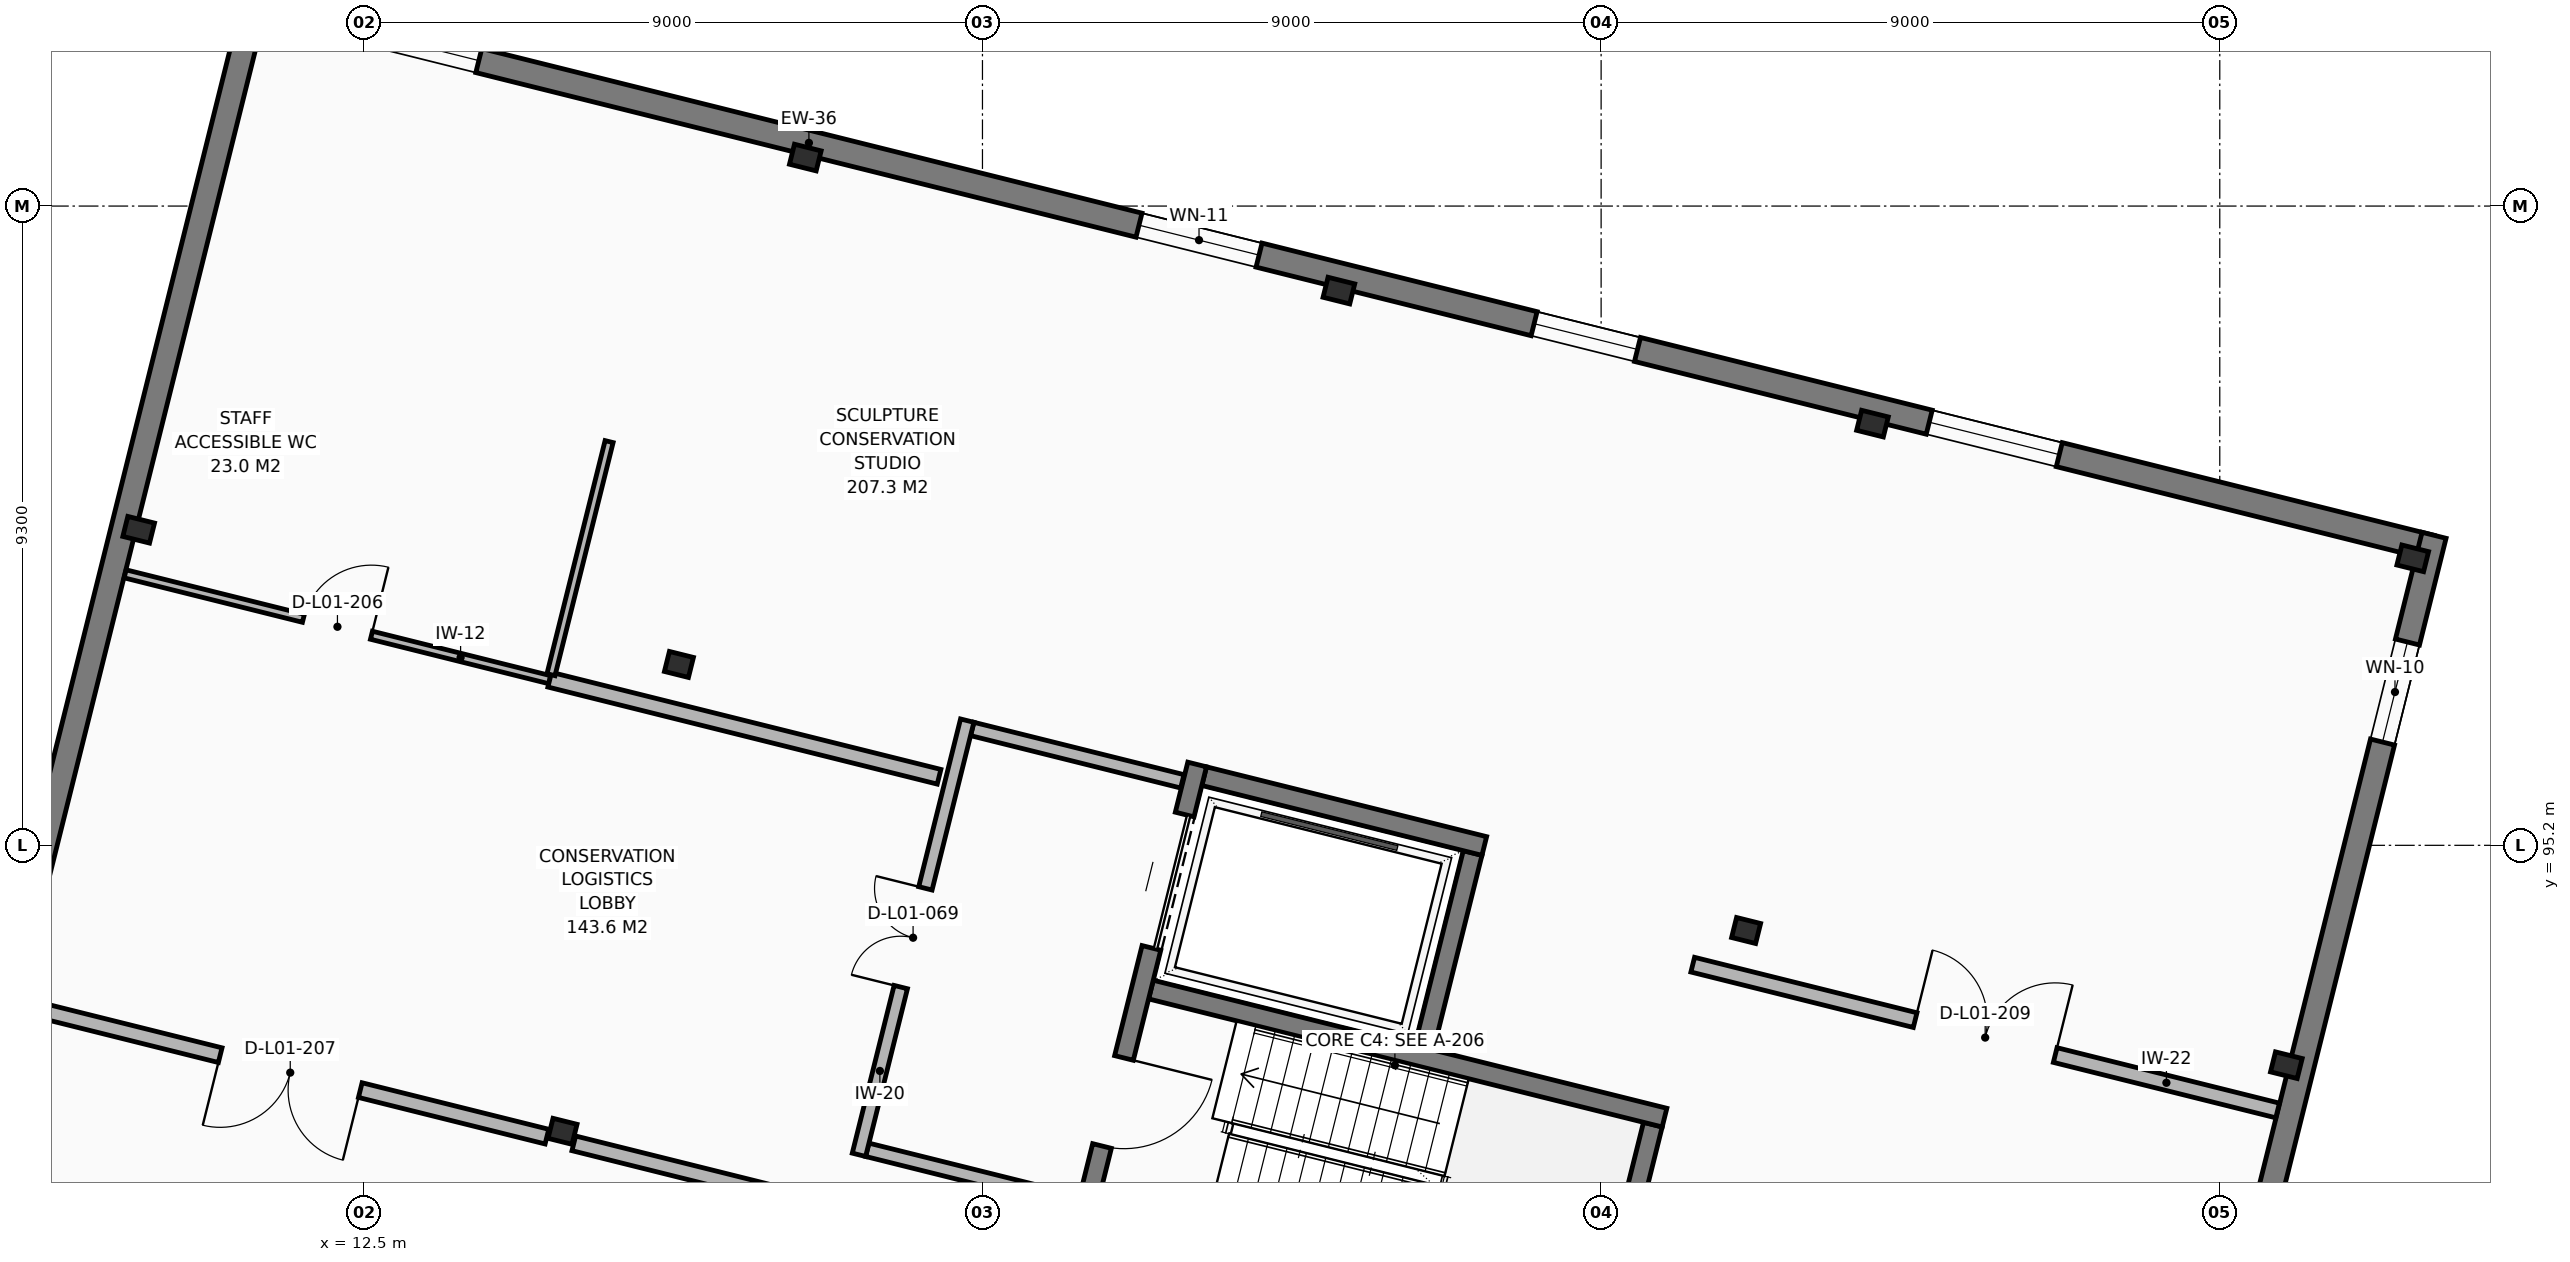
"""IFC4 building model, lengths in metres.
Left out: names, types, materials, properties, quantities, classifications, styles, units other than length and angle.
Written with IfcOpenShell. Run it as: python <this file> out.ifc"""

import sys

from ifc_helpers import new_model, si_unit, direction, frame, frame_2d, origin, origin_2d, place, context, subcontext, project, spatial, rectangle, i_section, extrude, element, fill, save


model = new_model("IFC4")
c1 = context("Model", 3, precision=1e-05, world=origin(), true_north=direction((0.0, 1.0)))
c2 = subcontext(c1, "Body", "Model", "MODEL_VIEW")
j1 = project(units=[si_unit("LENGTHUNIT", "METRE"), si_unit("PLANEANGLEUNIT", "RADIAN")], contexts=[c1])
p1 = place(None, origin())
s1 = spatial("IfcSite", under=j1, at=p1, CompositionType="ELEMENT")
p2 = place(p1, origin())
s2 = spatial("IfcBuilding", under=s1, at=p2, CompositionType="ELEMENT")
p3 = place(p2, frame((0.0, 0.0, 5.1)))
s3 = spatial("IfcBuildingStorey", under=s2, at=p3, CompositionType="ELEMENT", Elevation=5.1)
p4 = place(p3, frame((9.225, 99.791, 0.0), z_axis=(0.0, 0.0, 1.0), x_axis=(0.970295726276, -0.2419218956, 0.0)))
e1 = element("IfcColumn", 1, at=p4, inside=s3, PredefinedType="COLUMN", context=c2, shape_type="SweptSolid", body=[
    extrude(i_section(OverallWidth=0.3, OverallDepth=0.4, WebThickness=0.013, FlangeThickness=0.024, FilletRadius=0.027, at=origin_2d()), origin(), (0.0, 0.0, 1.0), 4.42),
])
for number, where, z_axis, x_axis in (
    (2, (15.391, 91.039, 0.0), (0.0, 0.0, 1.0), (0.97, -0.242, 0.0)),
    (3, (17.084, 97.831, 0.0), (0.0, 0.0, 1.0), (0.97, -0.242, 0.0)),
):
    element("IfcColumn", number, at=place(p3, frame(where, z_axis=z_axis, x_axis=x_axis)), inside=s3, PredefinedType="COLUMN", context=c2, shape_type="SweptSolid", body=[
        extrude(i_section(OverallWidth=0.3, OverallDepth=0.36, WebThickness=0.012, FlangeThickness=0.022, FilletRadius=0.027, at=origin_2d()), origin(), (0.0, 0.0, 1.0), 4.42),
    ])
for number, where, z_axis, x_axis in (
    (4, (18.923, 105.206, 0.0), (0.0, 0.0, 1.0), (0.97, -0.242, 0.0)),
    (5, (26.685, 103.27, 0.0), (0.0, 0.0, 1.0), (0.97, -0.242, 0.0)),
):
    element("IfcColumn", number, at=place(p3, frame(where, z_axis=z_axis, x_axis=x_axis)), inside=s3, PredefinedType="COLUMN", context=c2, shape_type="SweptSolid", body=[
        extrude(i_section(OverallWidth=0.3, OverallDepth=0.4, WebThickness=0.013, FlangeThickness=0.024, FilletRadius=0.027, at=origin_2d()), origin(), (0.0, 0.0, 1.0), 4.42),
    ])
p5 = place(p3, frame((32.609, 93.961, 0.0), z_axis=(0.0, 0.0, 1.0), x_axis=(0.970295726276, -0.2419218956, 0.0)))
e6 = element("IfcColumn", 6, at=p5, inside=s3, PredefinedType="COLUMN", context=c2, shape_type="SweptSolid", body=[
    extrude(i_section(OverallWidth=0.3, OverallDepth=0.36, WebThickness=0.012, FlangeThickness=0.022, FilletRadius=0.027, at=origin_2d()), origin(), (0.0, 0.0, 1.0), 4.42),
])
for number, where, z_axis, x_axis in (
    (7, (34.448, 101.335, 0.0), (0.0, 0.0, 1.0), (0.97, -0.242, 0.0)),
    (8, (40.469, 92.001, 0.0), (0.0, 0.0, 1.0), (0.97, -0.242, 0.0)),
    (9, (42.307, 99.375, 0.0), (0.0, 0.0, 1.0), (0.97, -0.242, 0.0)),
):
    element("IfcColumn", number, at=place(p3, frame(where, z_axis=z_axis, x_axis=x_axis)), inside=s3, PredefinedType="COLUMN", context=c2, shape_type="SweptSolid", body=[
        extrude(i_section(OverallWidth=0.3, OverallDepth=0.4, WebThickness=0.013, FlangeThickness=0.024, FilletRadius=0.027, at=origin_2d()), origin(), (0.0, 0.0, 1.0), 4.42),
    ])
p6 = place(p3, frame((5.383, 85.29, 0.0), z_axis=(0.0, 0.0, 1.0), x_axis=(0.241916316577, 0.970297117266, 0.0)))
e10 = element("IfcWall", 10, at=p6, inside=s3, PredefinedType="SOLIDWALL", context=c2, shape_type="SweptSolid", body=[
    extrude(rectangle(XDim=22.82, YDim=0.36, at=frame_2d((11.41, 0.0))), origin(), (0.0, 0.0, 1.0), 4.18),
])
p7 = place(p6, frame((1.6, 0.0, 0.85)))
e11 = element("IfcOpeningElement", 11, at=p7, cuts=e10, PredefinedType="OPENING", context=c2, shape_type="SweptSolid", body=[
    extrude(rectangle(XDim=1.55, YDim=1.5, at=frame_2d((0.775, 0.75))), frame((0.0, 0.19, 0.0), z_axis=(0.0, -1.0, 0.0), x_axis=(1.0, 0.0, 0.0)), (0.0, 0.0, 1.0), 0.38),
])
p8 = place(p3, frame((10.729, 107.475, 0.0), z_axis=(0.0, 0.0, 1.0), x_axis=(0.970297203556, -0.241915970475, 0.0)))
e12 = element("IfcWall", 12, at=p8, inside=s3, PredefinedType="SOLIDWALL", context=c2, shape_type="SweptSolid", body=[
    extrude(rectangle(XDim=32.82, YDim=0.36, at=frame_2d((16.41, 0.0))), origin(), (0.0, 0.0, 1.0), 4.18),
])
p9 = place(p8, frame((1.6, 0.0, 0.85)))
e13 = element("IfcOpeningElement", 13, at=p9, cuts=e12, PredefinedType="OPENING", context=c2, shape_type="SweptSolid", body=[
    extrude(rectangle(XDim=1.95, YDim=1.5, at=frame_2d((0.975, 0.75))), frame((0.0, 0.19, 0.0), z_axis=(0.0, -1.0, 0.0), x_axis=(1.0, 0.0, 0.0)), (0.0, 0.0, 1.0), 0.38),
])
p10 = place(p8, frame((13.448, 0.0, 0.85)))
e14 = element("IfcOpeningElement", 14, at=p10, cuts=e12, PredefinedType="OPENING", context=c2, shape_type="SweptSolid", body=[
    extrude(rectangle(XDim=1.8, YDim=1.7, at=frame_2d((0.9, 0.85))), frame((0.0, 0.19, 0.0), z_axis=(0.0, -1.0, 0.0), x_axis=(1.0, 0.0, 0.0)), (0.0, 0.0, 1.0), 0.38),
])
p11 = place(p8, frame((19.372, 0.0, 0.85)))
e15 = element("IfcOpeningElement", 15, at=p11, cuts=e12, PredefinedType="OPENING", context=c2, shape_type="SweptSolid", body=[
    extrude(rectangle(XDim=1.55, YDim=1.5, at=frame_2d((0.775, 0.75))), frame((0.0, 0.19, 0.0), z_axis=(0.0, -1.0, 0.0), x_axis=(1.0, 0.0, 0.0)), (0.0, 0.0, 1.0), 0.38),
])
p12 = place(p8, frame((25.296, 0.0, 0.85)))
e16 = element("IfcOpeningElement", 16, at=p12, cuts=e12, PredefinedType="OPENING", context=c2, shape_type="SweptSolid", body=[
    extrude(rectangle(XDim=1.95, YDim=1.5, at=frame_2d((0.975, 0.75))), frame((0.0, 0.19, 0.0), z_axis=(0.0, -1.0, 0.0), x_axis=(1.0, 0.0, 0.0)), (0.0, 0.0, 1.0), 0.38),
])
p13 = place(p3, frame((42.617, 99.71, 0.0), z_axis=(0.0, 0.0, 1.0), x_axis=(-0.241906463411, -0.970299573822, 0.0)))
e17 = element("IfcWall", 17, at=p13, inside=s3, PredefinedType="SOLIDWALL", context=c2, shape_type="SweptSolid", body=[
    extrude(rectangle(XDim=14.975, YDim=0.36, at=frame_2d((7.488, 0.0))), origin(), (0.0, 0.0, 1.0), 4.18),
])
p14 = place(p13, frame((1.6, 0.0, 0.85)))
e18 = element("IfcOpeningElement", 18, at=p14, cuts=e17, PredefinedType="OPENING", context=c2, shape_type="SweptSolid", body=[
    extrude(rectangle(XDim=1.5, YDim=1.7, at=frame_2d((0.75, 0.85))), frame((0.0, 0.19, 0.0), z_axis=(0.0, -1.0, 0.0), x_axis=(1.0, 0.0, 0.0)), (0.0, 0.0, 1.0), 0.38),
])
p15 = place(p3, frame((30.508, 88.148, 0.0), z_axis=(0.0, 0.0, 1.0), x_axis=(0.241920098373, 0.970296174373, 0.0)))
e19 = element("IfcWall", 19, at=p15, inside=s3, PredefinedType="SHEAR", context=c2, shape_type="SweptSolid", body=[
    extrude(rectangle(XDim=3.08, YDim=0.28, at=frame_2d((1.54, 0.0))), origin(), (0.0, 0.0, 1.0), 4.18),
])
p16 = place(p3, frame((31.422, 91.239, 0.0), z_axis=(0.0, 0.0, 1.0), x_axis=(-0.970297102167, 0.241916377137, 0.0)))
e20 = element("IfcWall", 20, at=p16, inside=s3, PredefinedType="SHEAR", context=c2, shape_type="SweptSolid", body=[
    extrude(rectangle(XDim=7.7, YDim=0.28, at=frame_2d((3.85, 0.0))), origin(), (0.0, 0.0, 1.0), 4.18),
])
p17 = place(p3, frame((27.924, 92.255, 0.0), z_axis=(0.0, 0.0, 1.0), x_axis=(0.241886356621, 0.970304586447, 0.0)))
e21 = element("IfcWall", 21, at=p17, inside=s3, PredefinedType="SHEAR", context=c2, shape_type="SweptSolid", body=[
    extrude(rectangle(XDim=2.92, YDim=0.28, at=frame_2d((1.46, 0.0))), origin(), (0.0, 0.0, 1.0), 4.18),
])
p18 = place(p3, frame((28.8, 95.19, 0.0), z_axis=(0.0, 0.0, 1.0), x_axis=(-0.970292765557, 0.241933770084, 0.0)))
e22 = element("IfcWall", 22, at=p18, inside=s3, PredefinedType="SHEAR", context=c2, shape_type="SweptSolid", body=[
    extrude(rectangle(XDim=4.2, YDim=0.28, at=frame_2d((2.1, 0.0))), origin(), (0.0, 0.0, 1.0), 4.18),
])
p19 = place(p3, frame((24.623, 96.376, 0.0), z_axis=(0.0, 0.0, 1.0), x_axis=(-0.241922508616, -0.970295573434, 0.0)))
e23 = element("IfcWall", 23, at=p19, inside=s3, PredefinedType="SHEAR", context=c2, shape_type="SweptSolid", body=[
    extrude(rectangle(XDim=6.84, YDim=0.28, at=frame_2d((3.42, 0.0))), origin(), (0.0, 0.0, 1.0), 4.18),
])
p20 = place(p19, frame((0.75, 0.0, 0.0)))
e24 = element("IfcOpeningElement", 24, at=p20, cuts=e23, PredefinedType="OPENING", context=c2, shape_type="SweptSolid", body=[
    extrude(rectangle(XDim=2.0, YDim=2.3, at=frame_2d((1.0, 1.15))), frame((0.0, 0.15, 0.0), z_axis=(0.0, -1.0, 0.0), x_axis=(1.0, 0.0, 0.0)), (0.0, 0.0, 1.0), 0.3),
])
p21 = place(p19, frame((4.4, 0.0, 0.0)))
e25 = element("IfcOpeningElement", 25, at=p21, cuts=e23, PredefinedType="OPENING", context=c2, shape_type="SweptSolid", body=[
    extrude(rectangle(XDim=1.32, YDim=2.12, at=frame_2d((0.66, 1.06))), frame((0.0, 0.15, 0.0), z_axis=(0.0, -1.0, 0.0), x_axis=(1.0, 0.0, 0.0)), (0.0, 0.0, 1.0), 0.3),
])
p22 = place(p3, frame((19.824, 90.77, 0.0), z_axis=(0.0, 0.0, 1.0), x_axis=(0.970306396763, -0.241879094592, 0.0)))
e26 = element("IfcWall", 26, at=p22, inside=s3, PredefinedType="PARTITIONING", context=c2, shape_type="SweptSolid", body=[
    extrude(rectangle(XDim=3.15, YDim=0.2, at=frame_2d((1.575, 0.0))), origin(), (0.0, 0.0, 1.0), 4.18),
])
p23 = place(p3, frame((24.407, 96.131, 0.0), z_axis=(0.0, 0.0, 1.0), x_axis=(-0.970301862046, 0.241897285042, 0.0)))
e27 = element("IfcWall", 27, at=p23, inside=s3, PredefinedType="PARTITIONING", context=c2, shape_type="SweptSolid", body=[
    extrude(rectangle(XDim=3.15, YDim=0.2, at=frame_2d((1.575, 0.0))), origin(), (0.0, 0.0, 1.0), 3.67),
])
p24 = place(p3, frame((19.703, 90.698, 0.0), z_axis=(0.0, 0.0, 1.0), x_axis=(0.24192671796, 0.970294523914, 0.0)))
e28 = element("IfcWall", 28, at=p24, inside=s3, PredefinedType="PARTITIONING", context=c2, shape_type="SweptSolid", body=[
    extrude(rectangle(XDim=6.51, YDim=0.2, at=frame_2d((3.255, 0.0))), origin(), (0.0, 0.0, 1.0), 3.67),
])
p25 = place(p24, frame((2.515, 0.0, 0.0)))
e29 = element("IfcOpeningElement", 29, at=p25, cuts=e28, PredefinedType="OPENING", context=c2, shape_type="SweptSolid", body=[
    extrude(rectangle(XDim=1.48, YDim=2.15, at=frame_2d((0.74, 1.075))), frame((0.0, 0.11, 0.0), z_axis=(0.0, -1.0, 0.0), x_axis=(1.0, 0.0, 0.0)), (0.0, 0.0, 1.0), 0.22),
])
p26 = place(p3, frame((9.028, 99.15, 0.0), z_axis=(0.0, 0.0, 1.0), x_axis=(0.97029571252, -0.241921950774, 0.0)))
e30 = element("IfcWall", 30, at=p26, inside=s3, PredefinedType="PARTITIONING", context=c2, shape_type="SweptSolid", body=[
    extrude(rectangle(XDim=6.366, YDim=0.12, at=frame_2d((3.183, 0.0))), origin(), (0.0, 0.0, 1.0), 3.72),
])
p27 = place(p26, frame((2.673, 0.0, 0.0)))
e31 = element("IfcOpeningElement", 31, at=p27, cuts=e30, PredefinedType="OPENING", context=c2, shape_type="SweptSolid", body=[
    extrude(rectangle(XDim=1.02, YDim=2.12, at=frame_2d((0.51, 1.06))), frame((0.0, 0.07, 0.0), z_axis=(0.0, -1.0, 0.0), x_axis=(1.0, 0.0, 0.0)), (0.0, 0.0, 1.0), 0.14),
])
p28 = place(p3, frame((15.164, 90.962, 0.0), z_axis=(0.0, 0.0, 1.0), x_axis=(-0.970289717068, 0.24194599594, 0.0)))
e32 = element("IfcWall", 32, at=p28, inside=s3, PredefinedType="PARTITIONING", context=c2, shape_type="SweptSolid", body=[
    extrude(rectangle(XDim=7.697, YDim=0.22, at=frame_2d((3.849, 0.0))), origin(), (0.0, 0.0, 1.0), 3.67),
])
p29 = place(p28, frame((2.799, 0.0, 0.0)))
e33 = element("IfcOpeningElement", 33, at=p29, cuts=e32, PredefinedType="OPENING", context=c2, shape_type="SweptSolid", body=[
    extrude(rectangle(XDim=2.1, YDim=2.25, at=frame_2d((1.05, 1.125))), frame((0.0, 0.12, 0.0), z_axis=(0.0, -1.0, 0.0), x_axis=(1.0, 0.0, 0.0)), (0.0, 0.0, 1.0), 0.24),
])
p30 = place(p3, frame((21.21, 89.454, 0.0), z_axis=(0.0, 0.0, 1.0), x_axis=(-0.970292611223, 0.241934389053, 0.0)))
e34 = element("IfcWall", 34, at=p30, inside=s3, PredefinedType="PARTITIONING", context=c2, shape_type="SweptSolid", body=[
    extrude(rectangle(XDim=5.829, YDim=0.22, at=frame_2d((2.914, 0.0))), origin(), (0.0, 0.0, 1.0), 3.67),
])
p31 = place(p3, frame((31.833, 93.464, 0.0), z_axis=(0.0, 0.0, 1.0), x_axis=(0.970297884388, -0.241913239719, 0.0)))
e35 = element("IfcWall", 35, at=p31, inside=s3, PredefinedType="PARTITIONING", context=c2, shape_type="SweptSolid", body=[
    extrude(rectangle(XDim=8.769, YDim=0.22, at=frame_2d((4.385, 0.0))), origin(), (0.0, 0.0, 1.0), 3.72),
])
p32 = place(p31, frame((3.334, 0.0, 0.0)))
e36 = element("IfcOpeningElement", 36, at=p32, cuts=e35, PredefinedType="OPENING", context=c2, shape_type="SweptSolid", body=[
    extrude(rectangle(XDim=2.1, YDim=2.25, at=frame_2d((1.05, 1.125))), frame((0.0, 0.12, 0.0), z_axis=(0.0, -1.0, 0.0), x_axis=(1.0, 0.0, 0.0)), (0.0, 0.0, 1.0), 0.24),
])
p33 = place(p3, frame((15.205, 97.61, 0.0), z_axis=(0.0, 0.0, 1.0), x_axis=(0.970294852546, -0.241925399911, 0.0)))
e37 = element("IfcWall", 37, at=p33, inside=s3, PredefinedType="PARTITIONING", context=c2, shape_type="SweptSolid", body=[
    extrude(rectangle(XDim=5.837, YDim=0.22, at=frame_2d((2.918, 0.0))), origin(), (0.0, 0.0, 1.0), 3.72),
])
p34 = place(p3, frame((16.069, 101.073, 0.0), z_axis=(0.0, 0.0, 1.0), x_axis=(-0.241976747044, -0.970282048628, 0.0)))
e38 = element("IfcWall", 38, at=p34, inside=s3, PredefinedType="PARTITIONING", context=c2, shape_type="SweptSolid", body=[
    extrude(rectangle(XDim=3.495, YDim=0.12, at=frame_2d((1.748, 0.0))), origin(), (0.0, 0.0, 1.0), 3.67),
])
p35 = place(p9, origin())
e39 = element("IfcWindow", 39, at=p35, inside=s3, PartitioningType="SINGLE_PANEL", PredefinedType="WINDOW", context=c2, shape_type="SweptSolid", body=[
    extrude(rectangle(XDim=1.95, YDim=1.5, at=frame_2d((0.975, 0.75))), frame((0.0, 0.03, 0.0), z_axis=(0.0, -1.0, 0.0), x_axis=(1.0, 0.0, 0.0)), (0.0, 0.0, 1.0), 0.06),
])
fill(e13, e39)
p36 = place(p10, origin())
e40 = element("IfcWindow", 40, at=p36, inside=s3, PartitioningType="SINGLE_PANEL", PredefinedType="WINDOW", context=c2, shape_type="SweptSolid", body=[
    extrude(rectangle(XDim=1.8, YDim=1.7, at=frame_2d((0.9, 0.85))), frame((0.0, 0.03, 0.0), z_axis=(0.0, -1.0, 0.0), x_axis=(1.0, 0.0, 0.0)), (0.0, 0.0, 1.0), 0.06),
])
fill(e14, e40)
p37 = place(p11, origin())
e41 = element("IfcWindow", 41, at=p37, inside=s3, PartitioningType="SINGLE_PANEL", PredefinedType="WINDOW", context=c2, shape_type="SweptSolid", body=[
    extrude(rectangle(XDim=1.55, YDim=1.5, at=frame_2d((0.775, 0.75))), frame((0.0, 0.03, 0.0), z_axis=(0.0, -1.0, 0.0), x_axis=(1.0, 0.0, 0.0)), (0.0, 0.0, 1.0), 0.06),
])
fill(e15, e41)
p38 = place(p12, origin())
e42 = element("IfcWindow", 42, at=p38, inside=s3, PartitioningType="SINGLE_PANEL", PredefinedType="WINDOW", context=c2, shape_type="SweptSolid", body=[
    extrude(rectangle(XDim=1.95, YDim=1.5, at=frame_2d((0.975, 0.75))), frame((0.0, 0.03, 0.0), z_axis=(0.0, -1.0, 0.0), x_axis=(1.0, 0.0, 0.0)), (0.0, 0.0, 1.0), 0.06),
])
fill(e16, e42)
p39 = place(p14, origin())
e43 = element("IfcWindow", 43, at=p39, inside=s3, PartitioningType="SINGLE_PANEL", PredefinedType="WINDOW", context=c2, shape_type="SweptSolid", body=[
    extrude(rectangle(XDim=1.5, YDim=1.7, at=frame_2d((0.75, 0.85))), frame((0.0, 0.03, 0.0), z_axis=(0.0, -1.0, 0.0), x_axis=(1.0, 0.0, 0.0)), (0.0, 0.0, 1.0), 0.06),
])
fill(e18, e43)
p40 = place(p20, origin())
e44 = element("IfcDoor", 44, at=p40, inside=s3, OperationType="SLIDING_TO_LEFT", PredefinedType="DOOR", context=c2, shape_type="SweptSolid", body=[
    extrude(rectangle(XDim=2.0, YDim=2.3, at=frame_2d((1.0, 1.15))), frame((0.0, 0.025, 0.0), z_axis=(0.0, -1.0, 0.0), x_axis=(1.0, 0.0, 0.0)), (0.0, 0.0, 1.0), 0.05),
])
fill(e24, e44)
p41 = place(p21, origin())
e45 = element("IfcDoor", 45, at=p41, inside=s3, OperationType="SINGLE_SWING_LEFT", PredefinedType="DOOR", context=c2, shape_type="SweptSolid", body=[
    extrude(rectangle(XDim=1.32, YDim=2.12, at=frame_2d((0.66, 1.06))), frame((0.0, 0.025, 0.0), z_axis=(0.0, -1.0, 0.0), x_axis=(1.0, 0.0, 0.0)), (0.0, 0.0, 1.0), 0.05),
])
fill(e25, e45)
p42 = place(p25, origin())
e46 = element("IfcDoor", 46, at=p42, inside=s3, OperationType="DOUBLE_DOOR_SINGLE_SWING", PredefinedType="DOOR", context=c2, shape_type="SweptSolid", body=[
    extrude(rectangle(XDim=1.48, YDim=2.15, at=frame_2d((0.74, 1.075))), frame((0.0, 0.025, 0.0), z_axis=(0.0, -1.0, 0.0), x_axis=(1.0, 0.0, 0.0)), (0.0, 0.0, 1.0), 0.05),
])
fill(e29, e46)
p43 = place(p27, origin())
e47 = element("IfcDoor", 47, at=p43, inside=s3, OperationType="SINGLE_SWING_RIGHT", PredefinedType="DOOR", context=c2, shape_type="SweptSolid", body=[
    extrude(rectangle(XDim=1.02, YDim=2.12, at=frame_2d((0.51, 1.06))), frame((0.0, 0.025, 0.0), z_axis=(0.0, -1.0, 0.0), x_axis=(1.0, 0.0, 0.0)), (0.0, 0.0, 1.0), 0.05),
])
fill(e31, e47)
p44 = place(p29, origin())
e48 = element("IfcDoor", 48, at=p44, inside=s3, OperationType="DOUBLE_DOOR_SINGLE_SWING", PredefinedType="DOOR", context=c2, shape_type="SweptSolid", body=[
    extrude(rectangle(XDim=2.1, YDim=2.25, at=frame_2d((1.05, 1.125))), frame((0.0, 0.025, 0.0), z_axis=(0.0, -1.0, 0.0), x_axis=(1.0, 0.0, 0.0)), (0.0, 0.0, 1.0), 0.05),
])
fill(e33, e48)
p45 = place(p32, origin())
e49 = element("IfcDoor", 49, at=p45, inside=s3, OperationType="DOUBLE_DOOR_SINGLE_SWING", PredefinedType="DOOR", context=c2, shape_type="SweptSolid", body=[
    extrude(rectangle(XDim=2.1, YDim=2.25, at=frame_2d((1.05, 1.125))), frame((0.0, 0.025, 0.0), z_axis=(0.0, -1.0, 0.0), x_axis=(1.0, 0.0, 0.0)), (0.0, 0.0, 1.0), 0.05),
])
fill(e36, e49)
save(model, sys.argv[1])
